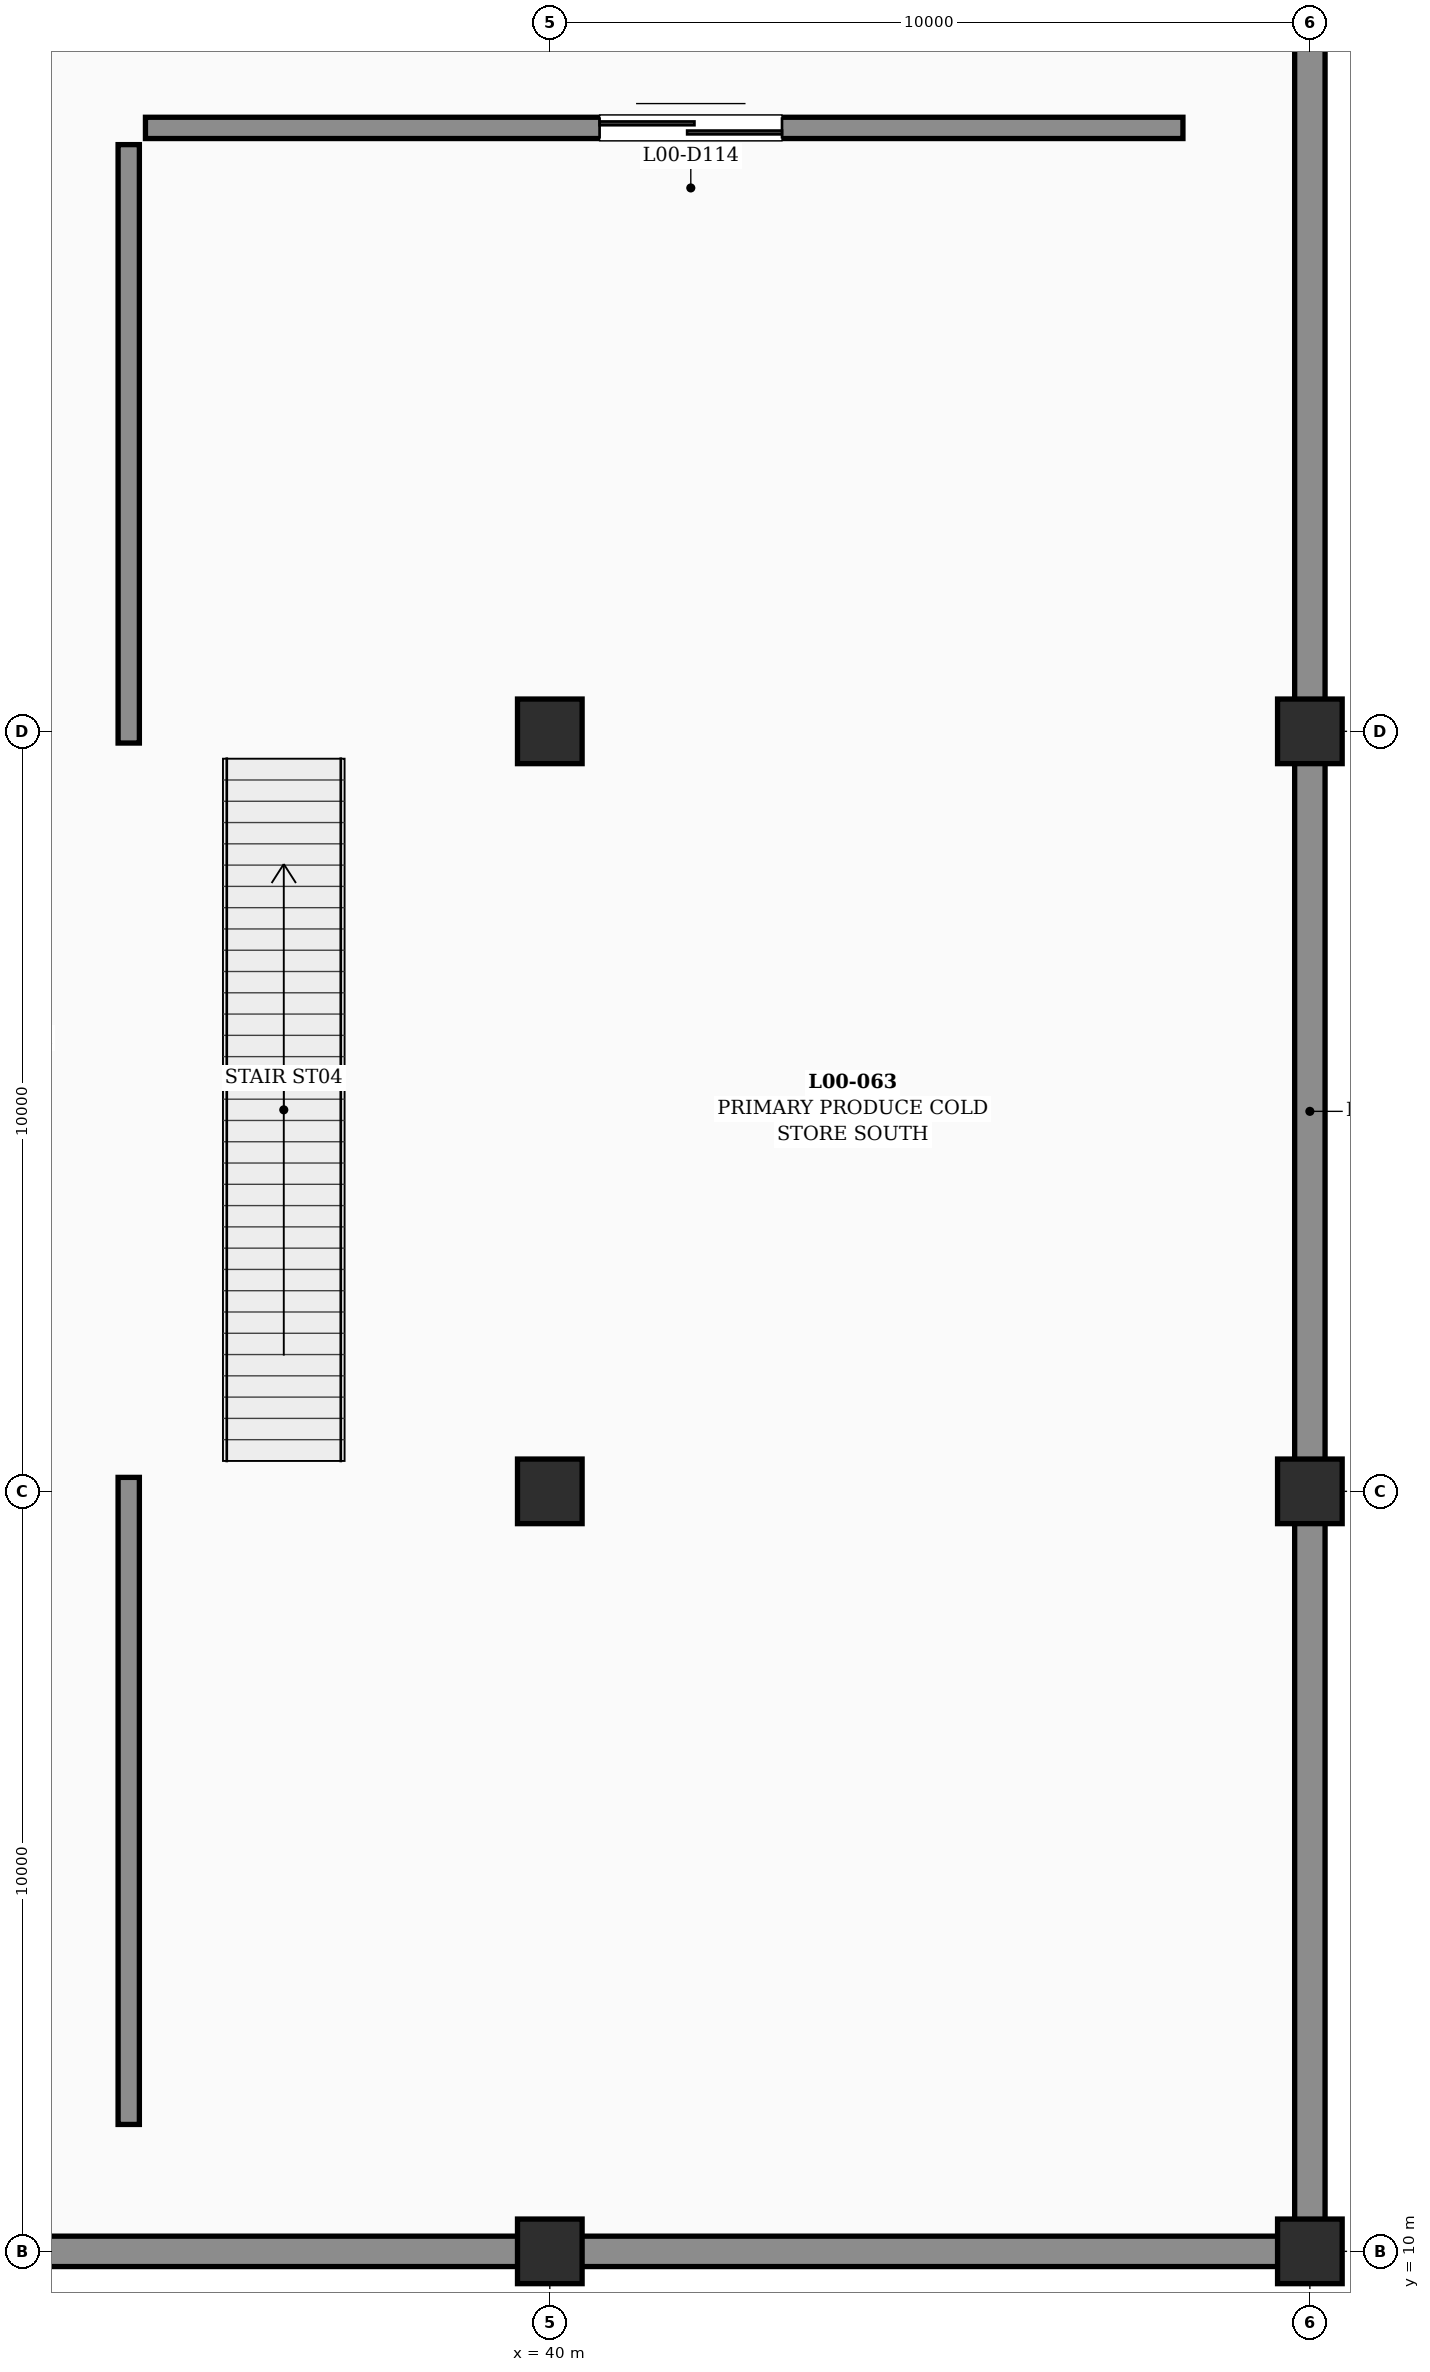
"""IFC4 building model, lengths in metres.
Left out: names, types, materials, properties, quantities, classifications, styles, units other than length and angle.
Written with IfcOpenShell. Run it as: python <this file> out.ifc"""

import sys

from ifc_helpers import new_model, si_unit, direction, frame, frame_2d, origin, origin_2d, place, context, subcontext, project, spatial, rectangle, extrude, element, fill, save


model = new_model("IFC4")
c1 = context("Model", 3, precision=1e-05, world=origin(), true_north=direction((0.0, 1.0)))
c2 = subcontext(c1, "Body", "Model", "MODEL_VIEW")
j1 = project(units=[si_unit("LENGTHUNIT", "METRE"), si_unit("PLANEANGLEUNIT", "RADIAN")], contexts=[c1])
p1 = place(None, origin())
s1 = spatial("IfcSite", under=j1, at=p1, CompositionType="ELEMENT")
p2 = place(p1, origin())
s2 = spatial("IfcBuilding", under=s1, at=p2, CompositionType="ELEMENT")
p3 = place(p2, origin())
s3 = spatial("IfcBuildingStorey", under=s2, at=p3, CompositionType="ELEMENT", Elevation=0.0)
for number, where, z_axis, x_axis in (
    (1, (40.0, 10.0, 0.0), (0.0, 0.0, 1.0), (1.0, 0.0, 0.0)),
    (2, (40.0, 20.0, 0.0), (0.0, 0.0, 1.0), (1.0, 0.0, 0.0)),
    (3, (40.0, 30.0, 0.0), (0.0, 0.0, 1.0), (1.0, 0.0, 0.0)),
    (4, (50.0, 10.0, 0.0), (0.0, 0.0, 1.0), (1.0, 0.0, 0.0)),
    (5, (50.0, 20.0, 0.0), (0.0, 0.0, 1.0), (1.0, 0.0, 0.0)),
    (6, (50.0, 30.0, 0.0), (0.0, 0.0, 1.0), (1.0, 0.0, 0.0)),
):
    element("IfcColumn", number, at=place(p3, frame(where, z_axis=z_axis, x_axis=x_axis)), inside=s3, PredefinedType="COLUMN", context=c2, shape_type="SweptSolid", body=[
        extrude(rectangle(XDim=0.85, YDim=0.85, at=origin_2d()), origin(), (0.0, 0.0, 1.0), 6.0),
    ])
for number, where, z_axis, x_axis in (
    (7, (50.0, 19.76, 0.0), (0.0, 0.0, 1.0), (0.0, -1.0, 0.0)),
    (8, (50.0, 29.76, 0.0), (0.0, 0.0, 1.0), (0.0, -1.0, 0.0)),
    (9, (50.0, 39.76, 0.0), (0.0, 0.0, 1.0), (0.0, -1.0, 0.0)),
):
    element("IfcWall", number, at=place(p3, frame(where, z_axis=z_axis, x_axis=x_axis)), inside=s3, PredefinedType="SOLIDWALL", context=c2, shape_type="SweptSolid", body=[
        extrude(rectangle(XDim=9.52, YDim=0.4, at=frame_2d((4.76, 0.0))), origin(), (0.0, 0.0, 1.0), 4.77),
    ])
p4 = place(p3, frame((30.24, 10.0, 0.0), z_axis=(0.0, 0.0, 1.0), x_axis=(1.0, 0.0, 0.0)))
e10 = element("IfcWall", 10, at=p4, inside=s3, PredefinedType="SOLIDWALL", context=c2, shape_type="SweptSolid", body=[
    extrude(rectangle(XDim=9.52, YDim=0.4, at=frame_2d((4.76, 0.0))), origin(), (0.0, 0.0, 1.0), 4.57),
])
p5 = place(p4, frame((1.1, 0.0, 0.0)))
e11 = element("IfcOpeningElement", 11, at=p5, cuts=e10, PredefinedType="OPENING", context=c2, shape_type="SweptSolid", body=[
    extrude(rectangle(XDim=2.0, YDim=2.4, at=frame_2d((1.0, 1.2))), frame((0.0, 0.21, 0.0), z_axis=(0.0, -1.0, 0.0), x_axis=(1.0, 0.0, 0.0)), (0.0, 0.0, 1.0), 0.42),
])
p6 = place(p3, frame((40.24, 10.0, 0.0), z_axis=(0.0, 0.0, 1.0), x_axis=(1.0, 0.0, 0.0)))
e12 = element("IfcWall", 12, at=p6, inside=s3, PredefinedType="SOLIDWALL", context=c2, shape_type="SweptSolid", body=[
    extrude(rectangle(XDim=9.52, YDim=0.4, at=frame_2d((4.76, 0.0))), origin(), (0.0, 0.0, 1.0), 4.57),
])
p7 = place(p3, frame((34.46, 11.67, 0.0), z_axis=(0.0, 0.0, 1.0), x_axis=(0.0, 1.0, 0.0)))
e13 = element("IfcWall", 13, at=p7, inside=s3, PredefinedType="PARTITIONING", context=c2, shape_type="SweptSolid", body=[
    extrude(rectangle(XDim=8.514, YDim=0.28, at=frame_2d((4.257, 0.0))), origin(), (0.0, 0.0, 1.0), 4.57),
])
p8 = place(p3, frame((34.46, 29.846, 0.0), z_axis=(0.0, 0.0, 1.0), x_axis=(0.0, 1.0, 0.0)))
e14 = element("IfcWall", 14, at=p8, inside=s3, PredefinedType="PARTITIONING", context=c2, shape_type="SweptSolid", body=[
    extrude(rectangle(XDim=7.874, YDim=0.28, at=frame_2d((3.937, 0.0))), origin(), (0.0, 0.0, 1.0), 4.57),
])
p9 = place(p3, frame((34.68, 37.94, 0.0), z_axis=(0.0, 0.0, 1.0), x_axis=(1.0, 0.0, 0.0)))
e15 = element("IfcWall", 15, at=p9, inside=s3, PredefinedType="PARTITIONING", context=c2, shape_type="SweptSolid", body=[
    extrude(rectangle(XDim=13.65, YDim=0.28, at=frame_2d((6.825, 0.0))), origin(), (0.0, 0.0, 1.0), 4.57),
])
p10 = place(p9, frame((5.975, 0.0, 0.0)))
e16 = element("IfcOpeningElement", 16, at=p10, cuts=e15, PredefinedType="OPENING", context=c2, shape_type="SweptSolid", body=[
    extrude(rectangle(XDim=2.4, YDim=2.45, at=frame_2d((1.2, 1.225))), frame((0.0, 0.15, 0.0), z_axis=(0.0, -1.0, 0.0), x_axis=(1.0, 0.0, 0.0)), (0.0, 0.0, 1.0), 0.3),
])
p11 = place(p10, origin())
e17 = element("IfcDoor", 17, at=p11, inside=s3, OperationType="DOUBLE_DOOR_SLIDING", PredefinedType="DOOR", context=c2, shape_type="SweptSolid", body=[
    extrude(rectangle(XDim=2.4, YDim=2.45, at=frame_2d((1.2, 1.225))), frame((0.0, 0.025, 0.0), z_axis=(0.0, -1.0, 0.0), x_axis=(1.0, 0.0, 0.0)), (0.0, 0.0, 1.0), 0.05),
])
fill(e16, e17)
save(model, sys.argv[1])
